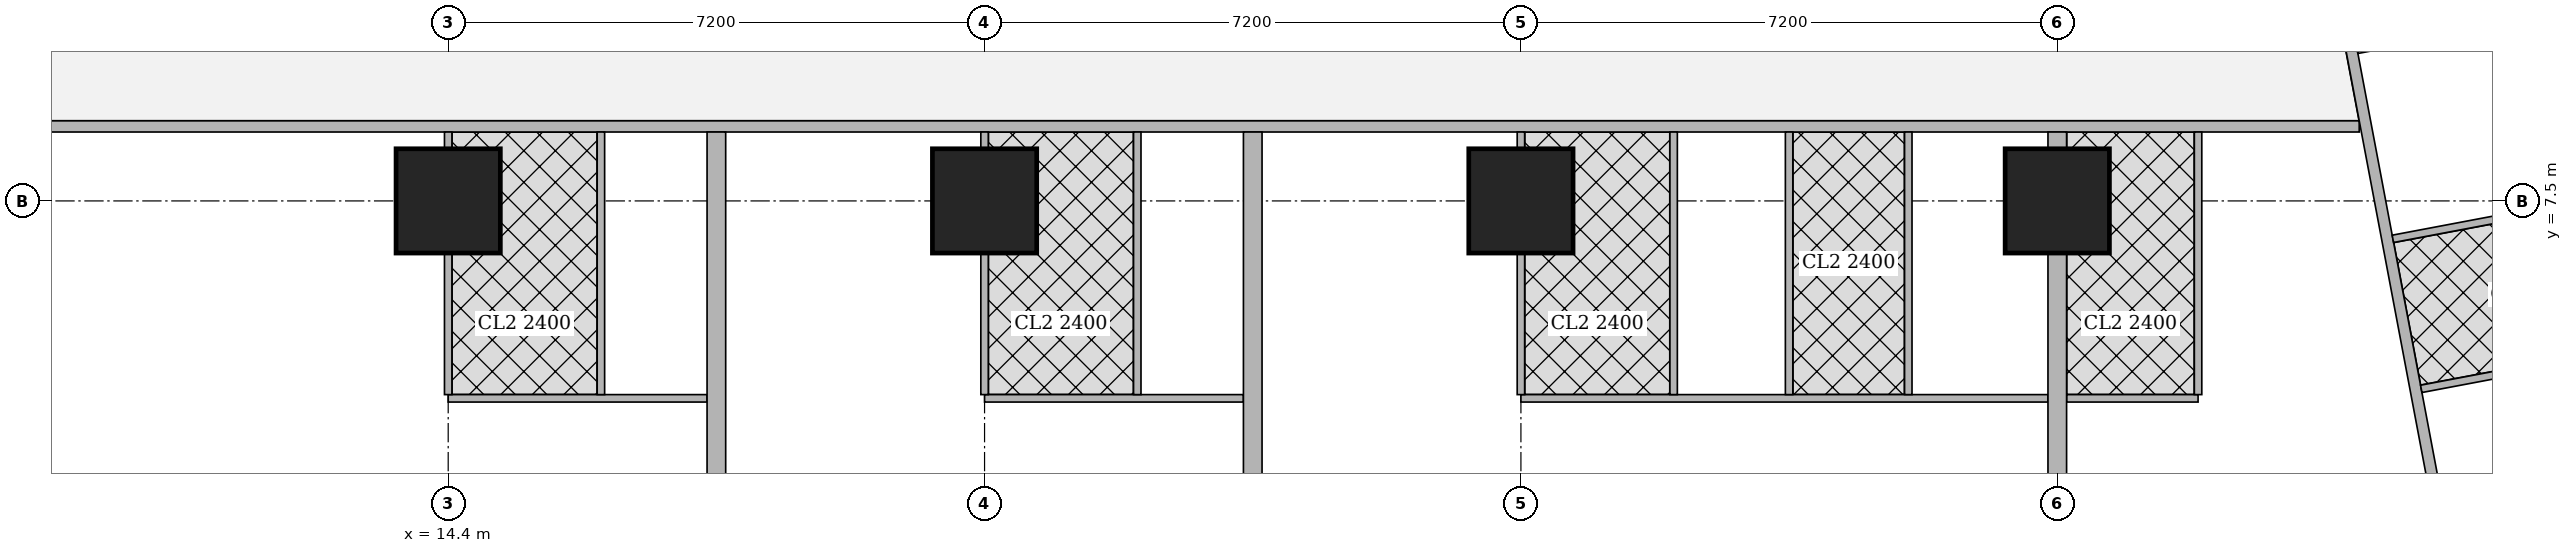
"""IFC4 building model, lengths in metres.
Left out: names, types, materials, properties, quantities, classifications, styles, units other than length and angle.
Written with IfcOpenShell. Run it as: python <this file> out.ifc"""

import sys

from ifc_helpers import new_model, si_unit, direction, frame, frame_2d, origin, origin_2d, place, context, subcontext, project, spatial, rectangle, extrude, element, fill, save


model = new_model("IFC4")
c1 = context("Model", 3, precision=1e-05, world=origin(), true_north=direction((0.0, 1.0)))
c2 = subcontext(c1, "Body", "Model", "MODEL_VIEW")
j1 = project(units=[si_unit("LENGTHUNIT", "METRE"), si_unit("PLANEANGLEUNIT", "RADIAN")], contexts=[c1])
p1 = place(None, origin())
s1 = spatial("IfcSite", under=j1, at=p1, CompositionType="ELEMENT")
p2 = place(p1, origin())
s2 = spatial("IfcBuilding", under=s1, at=p2, CompositionType="ELEMENT")
p3 = place(p2, frame((0.0, 0.0, 204.95)))
s3 = spatial("IfcBuildingStorey", under=s2, at=p3, CompositionType="ELEMENT", Elevation=204.95)
for number, where, z_axis, x_axis in (
    (1, (14.4, 7.5, 0.0), (0.0, 0.0, 1.0), (1.0, 0.0, 0.0)),
    (2, (21.6, 7.5, 0.0), (0.0, 0.0, 1.0), (1.0, 0.0, 0.0)),
    (3, (28.8, 7.5, 0.0), (0.0, 0.0, 1.0), (1.0, 0.0, 0.0)),
    (4, (36.0, 7.5, 0.0), (0.0, 0.0, 1.0), (1.0, 0.0, 0.0)),
):
    element("IfcColumn", number, at=place(p3, frame(where, z_axis=z_axis, x_axis=x_axis)), inside=s3, PredefinedType="COLUMN", context=c2, shape_type="SweptSolid", body=[
        extrude(rectangle(XDim=1.4, YDim=1.4, at=origin_2d()), origin(), (0.0, 0.0, 1.0), 3.75),
    ])
p4 = place(p3, frame((40.053, 8.5, 0.0), z_axis=(0.0, 0.0, 1.0), x_axis=(-1.0, 0.0, 0.0)))
e5 = element("IfcWall", 5, at=p4, inside=s3, PredefinedType="SOLIDWALL", context=c2, shape_type="SweptSolid", body=[
    extrude(rectangle(XDim=31.052, YDim=0.15, at=frame_2d((15.526, 0.0))), origin(), (0.0, 0.0, 1.0), 3.5),
])
p5 = place(p4, frame((29.178, 0.0, 0.0)))
e6 = element("IfcOpeningElement", 6, at=p5, cuts=e5, PredefinedType="OPENING", context=c2, shape_type="SweptSolid", body=[
    extrude(rectangle(XDim=1.0, YDim=2.1, at=frame_2d((0.5, 1.05))), frame((0.0, 0.085, 0.0), z_axis=(0.0, -1.0, 0.0), x_axis=(1.0, 0.0, 0.0)), (0.0, 0.0, 1.0), 0.17),
])
p6 = place(p4, frame((19.953, 0.0, 0.0)))
e7 = element("IfcOpeningElement", 7, at=p6, cuts=e5, PredefinedType="OPENING", context=c2, shape_type="SweptSolid", body=[
    extrude(rectangle(XDim=1.0, YDim=2.1, at=frame_2d((0.5, 1.05))), frame((0.0, 0.085, 0.0), z_axis=(0.0, -1.0, 0.0), x_axis=(1.0, 0.0, 0.0)), (0.0, 0.0, 1.0), 0.17),
])
p7 = place(p4, frame((12.753, 0.0, 0.0)))
e8 = element("IfcOpeningElement", 8, at=p7, cuts=e5, PredefinedType="OPENING", context=c2, shape_type="SweptSolid", body=[
    extrude(rectangle(XDim=1.0, YDim=2.1, at=frame_2d((0.5, 1.05))), frame((0.0, 0.085, 0.0), z_axis=(0.0, -1.0, 0.0), x_axis=(1.0, 0.0, 0.0)), (0.0, 0.0, 1.0), 0.17),
])
p8 = place(p4, frame((0.15, 0.0, 0.0)))
e9 = element("IfcOpeningElement", 9, at=p8, cuts=e5, PredefinedType="OPENING", context=c2, shape_type="SweptSolid", body=[
    extrude(rectangle(XDim=1.0, YDim=2.1, at=frame_2d((0.5, 1.05))), frame((0.0, 0.085, 0.0), z_axis=(0.0, -1.0, 0.0), x_axis=(1.0, 0.0, 0.0)), (0.0, 0.0, 1.0), 0.17),
])
p9 = place(p3, frame((33.68, 42.723, 0.0), z_axis=(0.0, 0.0, 1.0), x_axis=(0.185601160014, -0.982625162207, 0.0)))
e10 = element("IfcWall", 10, at=p9, inside=s3, PredefinedType="SOLIDWALL", context=c2, shape_type="SweptSolid", body=[
    extrude(rectangle(XDim=41.051, YDim=0.15, at=frame_2d((20.526, 0.0))), origin(), (0.0, 0.0, 1.0), 2.5),
])
p10 = place(p9, frame((12.307, 0.0, 0.0)))
e11 = element("IfcOpeningElement", 11, at=p10, cuts=e10, PredefinedType="OPENING", context=c2, shape_type="SweptSolid", body=[
    extrude(rectangle(XDim=1.0, YDim=2.1, at=frame_2d((0.5, 1.05))), frame((0.0, 0.085, 0.0), z_axis=(0.0, -1.0, 0.0), x_axis=(1.0, 0.0, 0.0)), (0.0, 0.0, 1.0), 0.17),
])
p11 = place(p9, frame((16.123, 0.0, 0.0)))
e12 = element("IfcOpeningElement", 12, at=p11, cuts=e10, PredefinedType="OPENING", context=c2, shape_type="SweptSolid", body=[
    extrude(rectangle(XDim=1.0, YDim=2.1, at=frame_2d((0.5, 1.05))), frame((0.0, 0.085, 0.0), z_axis=(0.0, -1.0, 0.0), x_axis=(1.0, 0.0, 0.0)), (0.0, 0.0, 1.0), 0.17),
])
p12 = place(p9, frame((30.902, 0.0, 0.0)))
e13 = element("IfcOpeningElement", 13, at=p12, cuts=e10, PredefinedType="OPENING", context=c2, shape_type="SweptSolid", body=[
    extrude(rectangle(XDim=1.0, YDim=2.1, at=frame_2d((0.5, 1.05))), frame((0.0, 0.085, 0.0), z_axis=(0.0, -1.0, 0.0), x_axis=(1.0, 0.0, 0.0)), (0.0, 0.0, 1.0), 0.17),
])
p13 = place(p3, frame((17.875, 4.85, 0.0), z_axis=(0.0, 0.0, 1.0), x_axis=(-1.0, 0.0, 0.0)))
e14 = element("IfcWall", 14, at=p13, inside=s3, PredefinedType="PARTITIONING", context=c2, shape_type="SweptSolid", body=[
    extrude(rectangle(XDim=3.475, YDim=0.1, at=frame_2d((1.738, 0.0))), origin(), (0.0, 0.0, 1.0), 3.5),
])
p14 = place(p13, frame((2.0, 0.0, 0.0)))
e15 = element("IfcOpeningElement", 15, at=p14, cuts=e14, PredefinedType="OPENING", context=c2, shape_type="SweptSolid", body=[
    extrude(rectangle(XDim=0.9, YDim=2.1, at=frame_2d((0.45, 1.05))), frame((0.0, 0.06, 0.0), z_axis=(0.0, -1.0, 0.0), x_axis=(1.0, 0.0, 0.0)), (0.0, 0.0, 1.0), 0.12),
])
p15 = place(p13, frame((0.2, 0.0, 0.0)))
e16 = element("IfcOpeningElement", 16, at=p15, cuts=e14, PredefinedType="OPENING", context=c2, shape_type="SweptSolid", body=[
    extrude(rectangle(XDim=0.9, YDim=2.1, at=frame_2d((0.45, 1.05))), frame((0.0, 0.06, 0.0), z_axis=(0.0, -1.0, 0.0), x_axis=(1.0, 0.0, 0.0)), (0.0, 0.0, 1.0), 0.12),
])
p16 = place(p3, frame((14.4, 4.9, 0.0), z_axis=(0.0, 0.0, 1.0), x_axis=(0.0, 1.0, 0.0)))
e17 = element("IfcWall", 17, at=p16, inside=s3, PredefinedType="PARTITIONING", context=c2, shape_type="SweptSolid", body=[
    extrude(rectangle(XDim=1.899, YDim=0.1, at=frame_2d((0.95, 0.0))), origin(), (0.0, 0.0, 1.0), 3.5),
])
p17 = place(p3, frame((14.4, 8.201, 0.0), z_axis=(0.0, 0.0, 1.0), x_axis=(0.0, 1.0, 0.0)))
e18 = element("IfcWall", 18, at=p17, inside=s3, PredefinedType="PARTITIONING", context=c2, shape_type="SweptSolid", body=[
    extrude(rectangle(XDim=0.224, YDim=0.1, at=frame_2d((0.112, 0.0))), origin(), (0.0, 0.0, 1.0), 3.5),
])
p18 = place(p3, frame((16.45, 4.9, 0.0), z_axis=(0.0, 0.0, 1.0), x_axis=(0.0, 1.0, 0.0)))
e19 = element("IfcWall", 19, at=p18, inside=s3, PredefinedType="PARTITIONING", context=c2, shape_type="SweptSolid", body=[
    extrude(rectangle(XDim=3.525, YDim=0.1, at=frame_2d((1.763, 0.0))), origin(), (0.0, 0.0, 1.0), 3.5),
])
p19 = place(p3, frame((25.075, 4.85, 0.0), z_axis=(0.0, 0.0, 1.0), x_axis=(-1.0, 0.0, 0.0)))
e20 = element("IfcWall", 20, at=p19, inside=s3, PredefinedType="PARTITIONING", context=c2, shape_type="SweptSolid", body=[
    extrude(rectangle(XDim=3.475, YDim=0.1, at=frame_2d((1.737, 0.0))), origin(), (0.0, 0.0, 1.0), 3.5),
])
p20 = place(p19, frame((2.0, 0.0, 0.0)))
e21 = element("IfcOpeningElement", 21, at=p20, cuts=e20, PredefinedType="OPENING", context=c2, shape_type="SweptSolid", body=[
    extrude(rectangle(XDim=0.9, YDim=2.1, at=frame_2d((0.45, 1.05))), frame((0.0, 0.06, 0.0), z_axis=(0.0, -1.0, 0.0), x_axis=(1.0, 0.0, 0.0)), (0.0, 0.0, 1.0), 0.12),
])
p21 = place(p19, frame((0.2, 0.0, 0.0)))
e22 = element("IfcOpeningElement", 22, at=p21, cuts=e20, PredefinedType="OPENING", context=c2, shape_type="SweptSolid", body=[
    extrude(rectangle(XDim=0.9, YDim=2.1, at=frame_2d((0.45, 1.05))), frame((0.0, 0.06, 0.0), z_axis=(0.0, -1.0, 0.0), x_axis=(1.0, 0.0, 0.0)), (0.0, 0.0, 1.0), 0.12),
])
p22 = place(p3, frame((21.6, 4.9, 0.0), z_axis=(0.0, 0.0, 1.0), x_axis=(0.0, 1.0, 0.0)))
e23 = element("IfcWall", 23, at=p22, inside=s3, PredefinedType="PARTITIONING", context=c2, shape_type="SweptSolid", body=[
    extrude(rectangle(XDim=1.899, YDim=0.1, at=frame_2d((0.95, 0.0))), origin(), (0.0, 0.0, 1.0), 3.5),
])
p23 = place(p3, frame((21.6, 8.201, 0.0), z_axis=(0.0, 0.0, 1.0), x_axis=(0.0, 1.0, 0.0)))
e24 = element("IfcWall", 24, at=p23, inside=s3, PredefinedType="PARTITIONING", context=c2, shape_type="SweptSolid", body=[
    extrude(rectangle(XDim=0.224, YDim=0.1, at=frame_2d((0.112, 0.0))), origin(), (0.0, 0.0, 1.0), 3.5),
])
p24 = place(p3, frame((23.65, 4.9, 0.0), z_axis=(0.0, 0.0, 1.0), x_axis=(0.0, 1.0, 0.0)))
e25 = element("IfcWall", 25, at=p24, inside=s3, PredefinedType="PARTITIONING", context=c2, shape_type="SweptSolid", body=[
    extrude(rectangle(XDim=3.525, YDim=0.1, at=frame_2d((1.763, 0.0))), origin(), (0.0, 0.0, 1.0), 3.5),
])
p25 = place(p3, frame((18.0, 3.65, 0.0), z_axis=(0.0, 0.0, 1.0), x_axis=(0.0, 1.0, 0.0)))
e26 = element("IfcWall", 26, at=p25, inside=s3, PredefinedType="SOLIDWALL", context=c2, shape_type="SweptSolid", body=[
    extrude(rectangle(XDim=4.775, YDim=0.25, at=frame_2d((2.388, 0.0))), origin(), (0.0, 0.0, 1.0), 3.5),
])
p26 = place(p3, frame((35.875, 4.85, 0.0), z_axis=(0.0, 0.0, 1.0), x_axis=(-1.0, 0.0, 0.0)))
e27 = element("IfcWall", 27, at=p26, inside=s3, PredefinedType="PARTITIONING", context=c2, shape_type="SweptSolid", body=[
    extrude(rectangle(XDim=7.075, YDim=0.1, at=frame_2d((3.538, 0.0))), origin(), (0.0, 0.0, 1.0), 3.5),
])
p27 = place(p26, frame((5.6, 0.0, 0.0)))
e28 = element("IfcOpeningElement", 28, at=p27, cuts=e27, PredefinedType="OPENING", context=c2, shape_type="SweptSolid", body=[
    extrude(rectangle(XDim=0.9, YDim=2.1, at=frame_2d((0.45, 1.05))), frame((0.0, 0.06, 0.0), z_axis=(0.0, -1.0, 0.0), x_axis=(1.0, 0.0, 0.0)), (0.0, 0.0, 1.0), 0.12),
])
p28 = place(p26, frame((2.225, 0.0, 0.0)))
e29 = element("IfcOpeningElement", 29, at=p28, cuts=e27, PredefinedType="OPENING", context=c2, shape_type="SweptSolid", body=[
    extrude(rectangle(XDim=0.9, YDim=2.1, at=frame_2d((0.45, 1.05))), frame((0.0, 0.06, 0.0), z_axis=(0.0, -1.0, 0.0), x_axis=(1.0, 0.0, 0.0)), (0.0, 0.0, 1.0), 0.12),
])
p29 = place(p26, frame((3.8, 0.0, 0.0)))
e30 = element("IfcOpeningElement", 30, at=p29, cuts=e27, PredefinedType="OPENING", context=c2, shape_type="SweptSolid", body=[
    extrude(rectangle(XDim=0.9, YDim=2.1, at=frame_2d((0.45, 1.05))), frame((0.0, 0.06, 0.0), z_axis=(0.0, -1.0, 0.0), x_axis=(1.0, 0.0, 0.0)), (0.0, 0.0, 1.0), 0.12),
])
p30 = place(p26, frame((0.425, 0.0, 0.0)))
e31 = element("IfcOpeningElement", 31, at=p30, cuts=e27, PredefinedType="OPENING", context=c2, shape_type="SweptSolid", body=[
    extrude(rectangle(XDim=0.9, YDim=2.1, at=frame_2d((0.45, 1.05))), frame((0.0, 0.06, 0.0), z_axis=(0.0, -1.0, 0.0), x_axis=(1.0, 0.0, 0.0)), (0.0, 0.0, 1.0), 0.12),
])
p31 = place(p3, frame((28.8, 4.9, 0.0), z_axis=(0.0, 0.0, 1.0), x_axis=(0.0, 1.0, 0.0)))
e32 = element("IfcWall", 32, at=p31, inside=s3, PredefinedType="PARTITIONING", context=c2, shape_type="SweptSolid", body=[
    extrude(rectangle(XDim=1.899, YDim=0.1, at=frame_2d((0.95, 0.0))), origin(), (0.0, 0.0, 1.0), 3.5),
])
p32 = place(p3, frame((28.8, 8.201, 0.0), z_axis=(0.0, 0.0, 1.0), x_axis=(0.0, 1.0, 0.0)))
e33 = element("IfcWall", 33, at=p32, inside=s3, PredefinedType="PARTITIONING", context=c2, shape_type="SweptSolid", body=[
    extrude(rectangle(XDim=0.224, YDim=0.1, at=frame_2d((0.112, 0.0))), origin(), (0.0, 0.0, 1.0), 3.5),
])
for number, where, z_axis, x_axis in (
    (34, (32.4, 4.9, 0.0), (0.0, 0.0, 1.0), (0.0, 1.0, 0.0)),
    (35, (30.85, 4.9, 0.0), (0.0, 0.0, 1.0), (0.0, 1.0, 0.0)),
    (36, (34.0, 4.9, 0.0), (0.0, 0.0, 1.0), (0.0, 1.0, 0.0)),
):
    element("IfcWall", number, at=place(p3, frame(where, z_axis=z_axis, x_axis=x_axis)), inside=s3, PredefinedType="PARTITIONING", context=c2, shape_type="SweptSolid", body=[
        extrude(rectangle(XDim=3.525, YDim=0.1, at=frame_2d((1.763, 0.0))), origin(), (0.0, 0.0, 1.0), 3.5),
    ])
p33 = place(p3, frame((25.2, 3.65, 0.0), z_axis=(0.0, 0.0, 1.0), x_axis=(0.0, 1.0, 0.0)))
e37 = element("IfcWall", 37, at=p33, inside=s3, PredefinedType="SOLIDWALL", context=c2, shape_type="SweptSolid", body=[
    extrude(rectangle(XDim=4.775, YDim=0.25, at=frame_2d((2.388, 0.0))), origin(), (0.0, 0.0, 1.0), 3.5),
])
p34 = place(p3, frame((37.89, 4.85, 0.0), z_axis=(0.0, 0.0, 1.0), x_axis=(-1.0, 0.0, 0.0)))
e38 = element("IfcWall", 38, at=p34, inside=s3, PredefinedType="PARTITIONING", context=c2, shape_type="SweptSolid", body=[
    extrude(rectangle(XDim=1.765, YDim=0.1, at=frame_2d((0.882, 0.0))), origin(), (0.0, 0.0, 1.0), 3.5),
])
p35 = place(p34, frame((0.49, 0.0, 0.0)))
e39 = element("IfcOpeningElement", 39, at=p35, cuts=e38, PredefinedType="OPENING", context=c2, shape_type="SweptSolid", body=[
    extrude(rectangle(XDim=0.9, YDim=2.1, at=frame_2d((0.45, 1.05))), frame((0.0, 0.06, 0.0), z_axis=(0.0, -1.0, 0.0), x_axis=(1.0, 0.0, 0.0)), (0.0, 0.0, 1.0), 0.12),
])
p36 = place(p3, frame((37.89, 4.9, 0.0), z_axis=(0.0, 0.0, 1.0), x_axis=(0.0, 1.0, 0.0)))
e40 = element("IfcWall", 40, at=p36, inside=s3, PredefinedType="PARTITIONING", context=c2, shape_type="SweptSolid", body=[
    extrude(rectangle(XDim=3.525, YDim=0.1, at=frame_2d((1.763, 0.0))), origin(), (0.0, 0.0, 1.0), 3.5),
])
p37 = place(p3, frame((36.0, 3.65, 0.0), z_axis=(0.0, 0.0, 1.0), x_axis=(0.0, 1.0, 0.0)))
e41 = element("IfcWall", 41, at=p37, inside=s3, PredefinedType="SOLIDWALL", context=c2, shape_type="SweptSolid", body=[
    extrude(rectangle(XDim=3.149, YDim=0.25, at=frame_2d((1.575, 0.0))), origin(), (0.0, 0.0, 1.0), 3.5),
])
p38 = place(p3, frame((36.0, 8.201, 0.0), z_axis=(0.0, 0.0, 1.0), x_axis=(0.0, 1.0, 0.0)))
e42 = element("IfcWall", 42, at=p38, inside=s3, PredefinedType="SOLIDWALL", context=c2, shape_type="SweptSolid", body=[
    extrude(rectangle(XDim=0.224, YDim=0.25, at=frame_2d((0.112, 0.0))), origin(), (0.0, 0.0, 1.0), 3.5),
])
p39 = place(p3, frame((43.49, 10.183, 0.0), z_axis=(0.0, 0.0, 1.0), x_axis=(-0.982588017646, -0.185797706064, 0.0)))
e43 = element("IfcWall", 43, at=p39, inside=s3, PredefinedType="PARTITIONING", context=c2, shape_type="SweptSolid", body=[
    extrude(rectangle(XDim=3.525, YDim=0.1, at=frame_2d((1.763, 0.0))), origin(), (0.0, 0.0, 1.0), 3.5),
])
p40 = place(p39, frame((1.325, 0.0, 0.0)))
e44 = element("IfcOpeningElement", 44, at=p40, cuts=e43, PredefinedType="OPENING", context=c2, shape_type="SweptSolid", body=[
    extrude(rectangle(XDim=0.9, YDim=2.1, at=frame_2d((0.45, 1.05))), frame((0.0, 0.06, 0.0), z_axis=(0.0, -1.0, 0.0), x_axis=(1.0, 0.0, 0.0)), (0.0, 0.0, 1.0), 0.12),
])
p41 = place(p3, frame((42.49, 7.366, 0.0), z_axis=(0.0, 0.0, 1.0), x_axis=(-0.982620917875, -0.185623629302, 0.0)))
e45 = element("IfcWall", 45, at=p41, inside=s3, PredefinedType="PARTITIONING", context=c2, shape_type="SweptSolid", body=[
    extrude(rectangle(XDim=2.02, YDim=0.1, at=frame_2d((1.01, 0.0))), origin(), (0.0, 0.0, 1.0), 3.5),
])
p42 = place(p3, frame((44.35, 5.631, 0.0), z_axis=(0.0, 0.0, 1.0), x_axis=(-0.982638553676, -0.185530247748, 0.0)))
e46 = element("IfcWall", 46, at=p42, inside=s3, PredefinedType="PARTITIONING", context=c2, shape_type="SweptSolid", body=[
    extrude(rectangle(XDim=3.525, YDim=0.1, at=frame_2d((1.763, 0.0))), origin(), (0.0, 0.0, 1.0), 3.5),
])
p43 = place(p3, frame((41.192, 3.356, 0.0), z_axis=(0.0, 0.0, 1.0), x_axis=(0.982588017646, 0.185797706064, 0.0)))
e47 = element("IfcWall", 47, at=p43, inside=s3, PredefinedType="PARTITIONING", context=c2, shape_type="SweptSolid", body=[
    extrude(rectangle(XDim=3.525, YDim=0.1, at=frame_2d((1.763, 0.0))), origin(), (0.0, 0.0, 1.0), 3.5),
])
p44 = place(p43, frame((1.7, 0.0, 0.0)))
e48 = element("IfcOpeningElement", 48, at=p44, cuts=e47, PredefinedType="OPENING", context=c2, shape_type="SweptSolid", body=[
    extrude(rectangle(XDim=0.9, YDim=2.1, at=frame_2d((0.45, 1.05))), frame((0.0, 0.06, 0.0), z_axis=(0.0, -1.0, 0.0), x_axis=(1.0, 0.0, 0.0)), (0.0, 0.0, 1.0), 0.12),
])
p45 = place(p14, origin())
e49 = element("IfcDoor", 49, at=p45, inside=s3, OperationType="SINGLE_SWING_LEFT", PredefinedType="DOOR", context=c2, shape_type="SweptSolid", body=[
    extrude(rectangle(XDim=0.9, YDim=2.1, at=frame_2d((0.45, 1.05))), frame((0.0, 0.025, 0.0), z_axis=(0.0, -1.0, 0.0), x_axis=(1.0, 0.0, 0.0)), (0.0, 0.0, 1.0), 0.05),
])
fill(e15, e49)
p46 = place(p15, origin())
e50 = element("IfcDoor", 50, at=p46, inside=s3, OperationType="SINGLE_SWING_RIGHT", PredefinedType="DOOR", context=c2, shape_type="SweptSolid", body=[
    extrude(rectangle(XDim=0.9, YDim=2.1, at=frame_2d((0.45, 1.05))), frame((0.0, 0.025, 0.0), z_axis=(0.0, -1.0, 0.0), x_axis=(1.0, 0.0, 0.0)), (0.0, 0.0, 1.0), 0.05),
])
fill(e16, e50)
p47 = place(p5, origin())
e51 = element("IfcDoor", 51, at=p47, inside=s3, OperationType="SINGLE_SWING_RIGHT", PredefinedType="DOOR", context=c2, shape_type="SweptSolid", body=[
    extrude(rectangle(XDim=1.0, YDim=2.1, at=frame_2d((0.5, 1.05))), frame((0.0, 0.025, 0.0), z_axis=(0.0, -1.0, 0.0), x_axis=(1.0, 0.0, 0.0)), (0.0, 0.0, 1.0), 0.05),
])
fill(e6, e51)
p48 = place(p20, origin())
e52 = element("IfcDoor", 52, at=p48, inside=s3, OperationType="SINGLE_SWING_LEFT", PredefinedType="DOOR", context=c2, shape_type="SweptSolid", body=[
    extrude(rectangle(XDim=0.9, YDim=2.1, at=frame_2d((0.45, 1.05))), frame((0.0, 0.025, 0.0), z_axis=(0.0, -1.0, 0.0), x_axis=(1.0, 0.0, 0.0)), (0.0, 0.0, 1.0), 0.05),
])
fill(e21, e52)
p49 = place(p21, origin())
e53 = element("IfcDoor", 53, at=p49, inside=s3, OperationType="SINGLE_SWING_RIGHT", PredefinedType="DOOR", context=c2, shape_type="SweptSolid", body=[
    extrude(rectangle(XDim=0.9, YDim=2.1, at=frame_2d((0.45, 1.05))), frame((0.0, 0.025, 0.0), z_axis=(0.0, -1.0, 0.0), x_axis=(1.0, 0.0, 0.0)), (0.0, 0.0, 1.0), 0.05),
])
fill(e22, e53)
p50 = place(p6, origin())
e54 = element("IfcDoor", 54, at=p50, inside=s3, OperationType="SINGLE_SWING_RIGHT", PredefinedType="DOOR", context=c2, shape_type="SweptSolid", body=[
    extrude(rectangle(XDim=1.0, YDim=2.1, at=frame_2d((0.5, 1.05))), frame((0.0, 0.025, 0.0), z_axis=(0.0, -1.0, 0.0), x_axis=(1.0, 0.0, 0.0)), (0.0, 0.0, 1.0), 0.05),
])
fill(e7, e54)
p51 = place(p27, origin())
e55 = element("IfcDoor", 55, at=p51, inside=s3, OperationType="SINGLE_SWING_LEFT", PredefinedType="DOOR", context=c2, shape_type="SweptSolid", body=[
    extrude(rectangle(XDim=0.9, YDim=2.1, at=frame_2d((0.45, 1.05))), frame((0.0, 0.025, 0.0), z_axis=(0.0, -1.0, 0.0), x_axis=(1.0, 0.0, 0.0)), (0.0, 0.0, 1.0), 0.05),
])
fill(e28, e55)
p52 = place(p28, origin())
e56 = element("IfcDoor", 56, at=p52, inside=s3, OperationType="SINGLE_SWING_LEFT", PredefinedType="DOOR", context=c2, shape_type="SweptSolid", body=[
    extrude(rectangle(XDim=0.9, YDim=2.1, at=frame_2d((0.45, 1.05))), frame((0.0, 0.025, 0.0), z_axis=(0.0, -1.0, 0.0), x_axis=(1.0, 0.0, 0.0)), (0.0, 0.0, 1.0), 0.05),
])
fill(e29, e56)
p53 = place(p29, origin())
e57 = element("IfcDoor", 57, at=p53, inside=s3, OperationType="SINGLE_SWING_LEFT", PredefinedType="DOOR", context=c2, shape_type="SweptSolid", body=[
    extrude(rectangle(XDim=0.9, YDim=2.1, at=frame_2d((0.45, 1.05))), frame((0.0, 0.025, 0.0), z_axis=(0.0, -1.0, 0.0), x_axis=(1.0, 0.0, 0.0)), (0.0, 0.0, 1.0), 0.05),
])
fill(e30, e57)
p54 = place(p30, origin())
e58 = element("IfcDoor", 58, at=p54, inside=s3, OperationType="SINGLE_SWING_RIGHT", PredefinedType="DOOR", context=c2, shape_type="SweptSolid", body=[
    extrude(rectangle(XDim=0.9, YDim=2.1, at=frame_2d((0.45, 1.05))), frame((0.0, 0.025, 0.0), z_axis=(0.0, -1.0, 0.0), x_axis=(1.0, 0.0, 0.0)), (0.0, 0.0, 1.0), 0.05),
])
fill(e31, e58)
p55 = place(p7, origin())
e59 = element("IfcDoor", 59, at=p55, inside=s3, OperationType="SINGLE_SWING_RIGHT", PredefinedType="DOOR", context=c2, shape_type="SweptSolid", body=[
    extrude(rectangle(XDim=1.0, YDim=2.1, at=frame_2d((0.5, 1.05))), frame((0.0, 0.025, 0.0), z_axis=(0.0, -1.0, 0.0), x_axis=(1.0, 0.0, 0.0)), (0.0, 0.0, 1.0), 0.05),
])
fill(e8, e59)
p56 = place(p35, origin())
e60 = element("IfcDoor", 60, at=p56, inside=s3, OperationType="SINGLE_SWING_LEFT", PredefinedType="DOOR", context=c2, shape_type="SweptSolid", body=[
    extrude(rectangle(XDim=0.9, YDim=2.1, at=frame_2d((0.45, 1.05))), frame((0.0, 0.025, 0.0), z_axis=(0.0, -1.0, 0.0), x_axis=(1.0, 0.0, 0.0)), (0.0, 0.0, 1.0), 0.05),
])
fill(e39, e60)
p57 = place(p8, origin())
e61 = element("IfcDoor", 61, at=p57, inside=s3, OperationType="SINGLE_SWING_LEFT", PredefinedType="DOOR", context=c2, shape_type="SweptSolid", body=[
    extrude(rectangle(XDim=1.0, YDim=2.1, at=frame_2d((0.5, 1.05))), frame((0.0, 0.025, 0.0), z_axis=(0.0, -1.0, 0.0), x_axis=(1.0, 0.0, 0.0)), (0.0, 0.0, 1.0), 0.05),
])
fill(e9, e61)
save(model, sys.argv[1])
